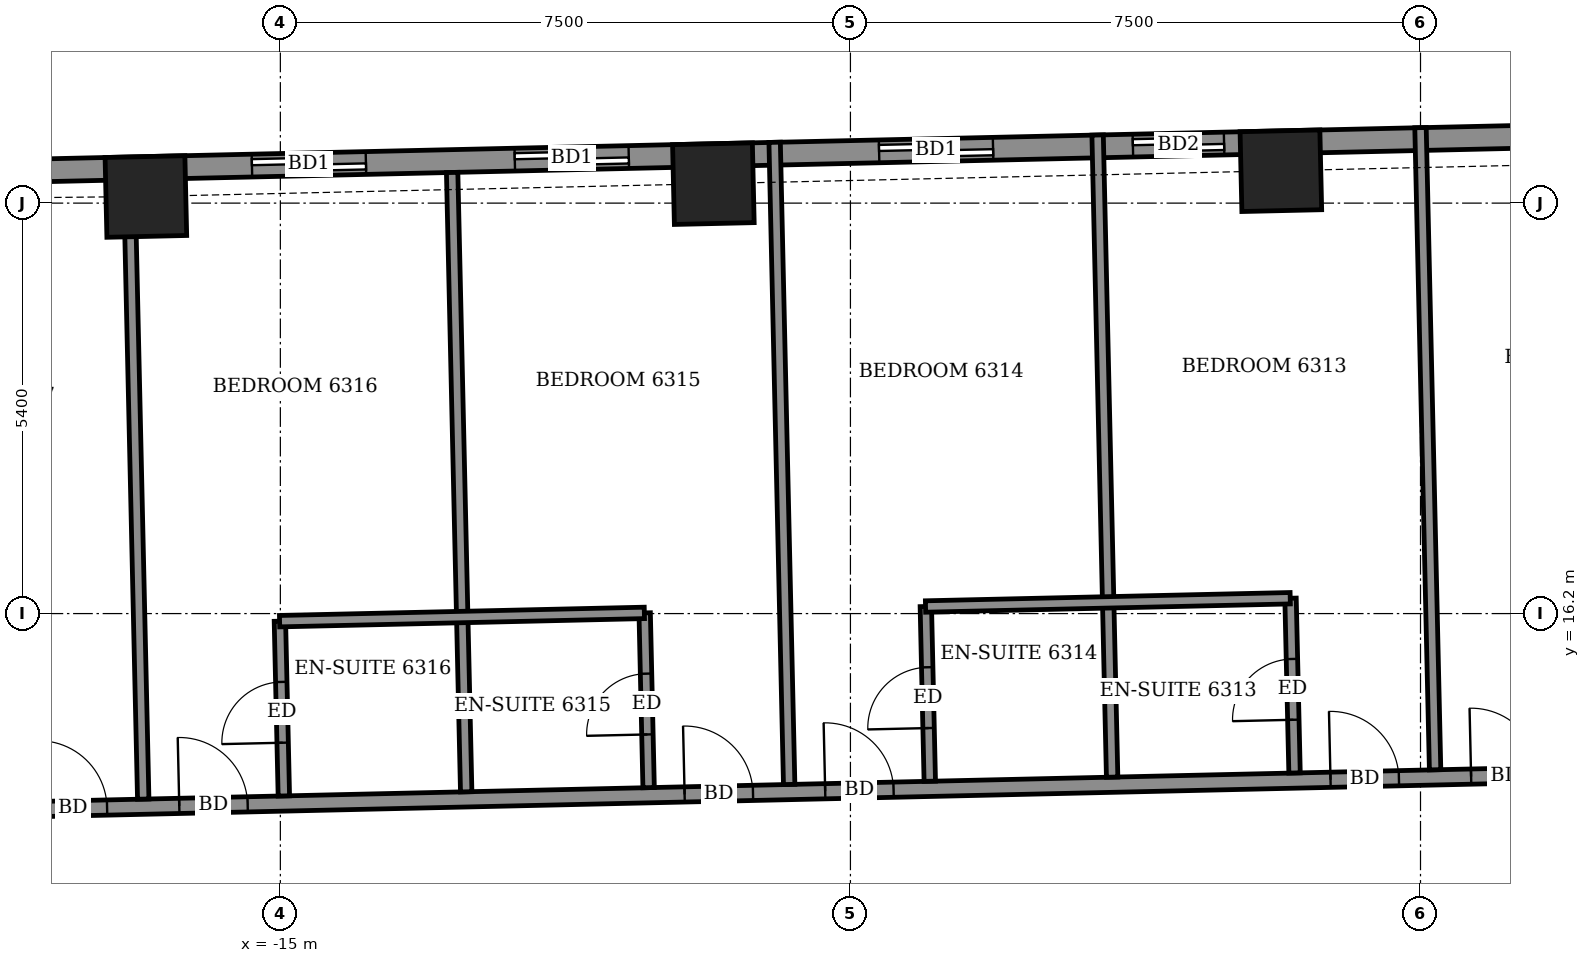
"""IFC4 building model, lengths in metres.
Left out: names, types, materials, properties, quantities, classifications, styles, units other than length and angle.
Written with IfcOpenShell. Run it as: python <this file> out.ifc"""

import sys

from ifc_helpers import new_model, si_unit, direction, frame, frame_2d, origin, origin_2d, place, context, subcontext, project, spatial, rectangle, extrude, element, fill, save


model = new_model("IFC4")
c1 = context("Model", 3, precision=1e-05, world=origin(), true_north=direction((0.0, 1.0)))
c2 = subcontext(c1, "Body", "Model", "MODEL_VIEW")
j1 = project(units=[si_unit("LENGTHUNIT", "METRE"), si_unit("PLANEANGLEUNIT", "RADIAN")], contexts=[c1])
p1 = place(None, origin())
s1 = spatial("IfcSite", under=j1, at=p1, CompositionType="ELEMENT")
p2 = place(p1, origin())
s2 = spatial("IfcBuilding", under=s1, at=p2, CompositionType="ELEMENT")
p3 = place(p2, frame((0.0, 0.0, 249.1)))
s3 = spatial("IfcBuildingStorey", under=s2, at=p3, CompositionType="ELEMENT", Elevation=249.1)
for number, where, z_axis, x_axis in (
    (1, (-1.837, 22.026, -0.55), (0.0, 0.0, 1.0), (-1.0, -0.023, 0.0)),
    (2, (-9.303, 21.856, -0.55), (0.0, 0.0, 1.0), (-1.0, -0.023, 0.0)),
    (3, (-16.769, 21.687, -0.55), (0.0, 0.0, 1.0), (-1.0, -0.023, 0.0)),
):
    element("IfcColumn", number, at=place(p3, frame(where, z_axis=z_axis, x_axis=x_axis)), inside=s3, PredefinedType="COLUMN", context=c2, shape_type="SweptSolid", body=[
        extrude(rectangle(XDim=1.05, YDim=1.05, at=origin_2d()), origin(), (0.0, 0.0, 1.0), 3.6),
    ])
p4 = place(p3, frame((20.403, 22.905, 0.0), z_axis=(0.0, 0.0, 1.0), x_axis=(-0.99974298964, -0.022670568288, 0.0)))
e4 = element("IfcWall", 4, at=p4, inside=s3, PredefinedType="SOLIDWALL", context=c2, shape_type="SweptSolid", body=[
    extrude(rectangle(XDim=44.509, YDim=0.3, at=frame_2d((22.254, 0.0))), origin(), (0.0, 0.0, 1.0), 2.5),
])
p5 = place(p4, frame((1.272, 0.0, 0.0)))
e5 = element("IfcOpeningElement", 5, at=p5, cuts=e4, PredefinedType="OPENING", context=c2, shape_type="SweptSolid", body=[
    extrude(rectangle(XDim=1.5, YDim=2.4, at=frame_2d((0.75, 1.2))), frame((0.0, 0.16, 0.0), z_axis=(0.0, -1.0, 0.0), x_axis=(1.0, 0.0, 0.0)), (0.0, 0.0, 1.0), 0.32),
])
p6 = place(p4, frame((4.501, 0.0, 0.0)))
e6 = element("IfcOpeningElement", 6, at=p6, cuts=e4, PredefinedType="OPENING", context=c2, shape_type="SweptSolid", body=[
    extrude(rectangle(XDim=1.5, YDim=2.4, at=frame_2d((0.75, 1.2))), frame((0.0, 0.16, 0.0), z_axis=(0.0, -1.0, 0.0), x_axis=(1.0, 0.0, 0.0)), (0.0, 0.0, 1.0), 0.32),
])
p7 = place(p4, frame((9.058, 0.0, 0.0)))
e7 = element("IfcOpeningElement", 7, at=p7, cuts=e4, PredefinedType="OPENING", context=c2, shape_type="SweptSolid", body=[
    extrude(rectangle(XDim=1.5, YDim=2.4, at=frame_2d((0.75, 1.2))), frame((0.0, 0.16, 0.0), z_axis=(0.0, -1.0, 0.0), x_axis=(1.0, 0.0, 0.0)), (0.0, 0.0, 1.0), 0.32),
])
p8 = place(p4, frame((12.46, 0.0, 0.0)))
e8 = element("IfcOpeningElement", 8, at=p8, cuts=e4, PredefinedType="OPENING", context=c2, shape_type="SweptSolid", body=[
    extrude(rectangle(XDim=1.5, YDim=2.4, at=frame_2d((0.75, 1.2))), frame((0.0, 0.16, 0.0), z_axis=(0.0, -1.0, 0.0), x_axis=(1.0, 0.0, 0.0)), (0.0, 0.0, 1.0), 0.32),
])
p9 = place(p4, frame((17.533, 0.0, 0.0)))
e9 = element("IfcOpeningElement", 9, at=p9, cuts=e4, PredefinedType="OPENING", context=c2, shape_type="SweptSolid", body=[
    extrude(rectangle(XDim=1.5, YDim=2.4, at=frame_2d((0.75, 1.2))), frame((0.0, 0.16, 0.0), z_axis=(0.0, -1.0, 0.0), x_axis=(1.0, 0.0, 0.0)), (0.0, 0.0, 1.0), 0.32),
])
p10 = place(p4, frame((22.993, 0.0, 0.0)))
e10 = element("IfcOpeningElement", 10, at=p10, cuts=e4, PredefinedType="OPENING", context=c2, shape_type="SweptSolid", body=[
    extrude(rectangle(XDim=1.2, YDim=2.4, at=frame_2d((0.6, 1.2))), frame((0.0, 0.16, 0.0), z_axis=(0.0, -1.0, 0.0), x_axis=(1.0, 0.0, 0.0)), (0.0, 0.0, 1.0), 0.32),
])
p11 = place(p4, frame((26.033, 0.0, 0.0)))
e11 = element("IfcOpeningElement", 11, at=p11, cuts=e4, PredefinedType="OPENING", context=c2, shape_type="SweptSolid", body=[
    extrude(rectangle(XDim=1.5, YDim=2.4, at=frame_2d((0.75, 1.2))), frame((0.0, 0.16, 0.0), z_axis=(0.0, -1.0, 0.0), x_axis=(1.0, 0.0, 0.0)), (0.0, 0.0, 1.0), 0.32),
])
p12 = place(p4, frame((30.827, 0.0, 0.0)))
e12 = element("IfcOpeningElement", 12, at=p12, cuts=e4, PredefinedType="OPENING", context=c2, shape_type="SweptSolid", body=[
    extrude(rectangle(XDim=1.5, YDim=2.4, at=frame_2d((0.75, 1.2))), frame((0.0, 0.16, 0.0), z_axis=(0.0, -1.0, 0.0), x_axis=(1.0, 0.0, 0.0)), (0.0, 0.0, 1.0), 0.32),
])
p13 = place(p4, frame((34.286, 0.0, 0.0)))
e13 = element("IfcOpeningElement", 13, at=p13, cuts=e4, PredefinedType="OPENING", context=c2, shape_type="SweptSolid", body=[
    extrude(rectangle(XDim=1.5, YDim=2.4, at=frame_2d((0.75, 1.2))), frame((0.0, 0.16, 0.0), z_axis=(0.0, -1.0, 0.0), x_axis=(1.0, 0.0, 0.0)), (0.0, 0.0, 1.0), 0.32),
])
p14 = place(p4, frame((38.811, 0.0, 0.0)))
e14 = element("IfcOpeningElement", 14, at=p14, cuts=e4, PredefinedType="OPENING", context=c2, shape_type="SweptSolid", body=[
    extrude(rectangle(XDim=1.5, YDim=2.4, at=frame_2d((0.75, 1.2))), frame((0.0, 0.16, 0.0), z_axis=(0.0, -1.0, 0.0), x_axis=(1.0, 0.0, 0.0)), (0.0, 0.0, 1.0), 0.32),
])
p15 = place(p4, frame((42.148, 0.0, 0.9)))
e15 = element("IfcOpeningElement", 15, at=p15, cuts=e4, PredefinedType="OPENING", context=c2, shape_type="SweptSolid", body=[
    extrude(rectangle(XDim=1.2, YDim=1.5, at=frame_2d((0.6, 0.75))), frame((0.0, 0.16, 0.0), z_axis=(0.0, -1.0, 0.0), x_axis=(1.0, 0.0, 0.0)), (0.0, 0.0, 1.0), 0.32),
])
p16 = place(p3, frame((-27.652, 13.413, 0.0), z_axis=(0.0, 0.0, 1.0), x_axis=(0.999742864992, 0.022676064408, 0.0)))
e16 = element("IfcWall", 16, at=p16, inside=s3, PredefinedType="PARTITIONING", context=c2, shape_type="SweptSolid", body=[
    extrude(rectangle(XDim=50.882, YDim=0.2, at=frame_2d((25.441, 0.0))), origin(), (0.0, 0.0, 1.0), 3.05),
])
p17 = place(p16, frame((47.801, 0.0, 0.0)))
e17 = element("IfcOpeningElement", 17, at=p17, cuts=e16, PredefinedType="OPENING", context=c2, shape_type="SweptSolid", body=[
    extrude(rectangle(XDim=1.0, YDim=2.1, at=frame_2d((0.5, 1.05))), frame((0.0, 0.11, 0.0), z_axis=(0.0, -1.0, 0.0), x_axis=(1.0, 0.0, 0.0)), (0.0, 0.0, 1.0), 0.22),
])
p18 = place(p16, frame((43.425, 0.0, 0.0)))
e18 = element("IfcOpeningElement", 18, at=p18, cuts=e16, PredefinedType="OPENING", context=c2, shape_type="SweptSolid", body=[
    extrude(rectangle(XDim=0.9, YDim=2.1, at=frame_2d((0.45, 1.05))), frame((0.0, 0.11, 0.0), z_axis=(0.0, -1.0, 0.0), x_axis=(1.0, 0.0, 0.0)), (0.0, 0.0, 1.0), 0.22),
])
p19 = place(p16, frame((36.8, 0.0, 0.0)))
e19 = element("IfcOpeningElement", 19, at=p19, cuts=e16, PredefinedType="OPENING", context=c2, shape_type="SweptSolid", body=[
    extrude(rectangle(XDim=0.9, YDim=2.1, at=frame_2d((0.45, 1.05))), frame((0.0, 0.11, 0.0), z_axis=(0.0, -1.0, 0.0), x_axis=(1.0, 0.0, 0.0)), (0.0, 0.0, 1.0), 0.22),
])
p20 = place(p16, frame((34.975, 0.0, 0.0)))
e20 = element("IfcOpeningElement", 20, at=p20, cuts=e16, PredefinedType="OPENING", context=c2, shape_type="SweptSolid", body=[
    extrude(rectangle(XDim=0.9, YDim=2.1, at=frame_2d((0.45, 1.05))), frame((0.0, 0.11, 0.0), z_axis=(0.0, -1.0, 0.0), x_axis=(1.0, 0.0, 0.0)), (0.0, 0.0, 1.0), 0.22),
])
p21 = place(p16, frame((28.325, 0.0, 0.0)))
e21 = element("IfcOpeningElement", 21, at=p21, cuts=e16, PredefinedType="OPENING", context=c2, shape_type="SweptSolid", body=[
    extrude(rectangle(XDim=0.9, YDim=2.1, at=frame_2d((0.45, 1.05))), frame((0.0, 0.11, 0.0), z_axis=(0.0, -1.0, 0.0), x_axis=(1.0, 0.0, 0.0)), (0.0, 0.0, 1.0), 0.22),
])
p22 = place(p16, frame((26.475, 0.0, 0.0)))
e22 = element("IfcOpeningElement", 22, at=p22, cuts=e16, PredefinedType="OPENING", context=c2, shape_type="SweptSolid", body=[
    extrude(rectangle(XDim=0.9, YDim=2.1, at=frame_2d((0.45, 1.05))), frame((0.0, 0.11, 0.0), z_axis=(0.0, -1.0, 0.0), x_axis=(1.0, 0.0, 0.0)), (0.0, 0.0, 1.0), 0.22),
])
p23 = place(p16, frame((19.825, 0.0, 0.0)))
e23 = element("IfcOpeningElement", 23, at=p23, cuts=e16, PredefinedType="OPENING", context=c2, shape_type="SweptSolid", body=[
    extrude(rectangle(XDim=0.9, YDim=2.1, at=frame_2d((0.45, 1.05))), frame((0.0, 0.11, 0.0), z_axis=(0.0, -1.0, 0.0), x_axis=(1.0, 0.0, 0.0)), (0.0, 0.0, 1.0), 0.22),
])
p24 = place(p16, frame((17.975, 0.0, 0.0)))
e24 = element("IfcOpeningElement", 24, at=p24, cuts=e16, PredefinedType="OPENING", context=c2, shape_type="SweptSolid", body=[
    extrude(rectangle(XDim=0.9, YDim=2.1, at=frame_2d((0.45, 1.05))), frame((0.0, 0.11, 0.0), z_axis=(0.0, -1.0, 0.0), x_axis=(1.0, 0.0, 0.0)), (0.0, 0.0, 1.0), 0.22),
])
p25 = place(p16, frame((11.325, 0.0, 0.0)))
e25 = element("IfcOpeningElement", 25, at=p25, cuts=e16, PredefinedType="OPENING", context=c2, shape_type="SweptSolid", body=[
    extrude(rectangle(XDim=0.9, YDim=2.1, at=frame_2d((0.45, 1.05))), frame((0.0, 0.11, 0.0), z_axis=(0.0, -1.0, 0.0), x_axis=(1.0, 0.0, 0.0)), (0.0, 0.0, 1.0), 0.22),
])
p26 = place(p16, frame((9.475, 0.0, 0.0)))
e26 = element("IfcOpeningElement", 26, at=p26, cuts=e16, PredefinedType="OPENING", context=c2, shape_type="SweptSolid", body=[
    extrude(rectangle(XDim=0.9, YDim=2.1, at=frame_2d((0.45, 1.05))), frame((0.0, 0.11, 0.0), z_axis=(0.0, -1.0, 0.0), x_axis=(1.0, 0.0, 0.0)), (0.0, 0.0, 1.0), 0.22),
])
p27 = place(p16, frame((2.772, 0.0, 0.0)))
e27 = element("IfcOpeningElement", 27, at=p27, cuts=e16, PredefinedType="OPENING", context=c2, shape_type="SweptSolid", body=[
    extrude(rectangle(XDim=1.0, YDim=2.1, at=frame_2d((0.5, 1.05))), frame((0.0, 0.11, 0.0), z_axis=(0.0, -1.0, 0.0), x_axis=(1.0, 0.0, 0.0)), (0.0, 0.0, 1.0), 0.22),
])
p28 = place(p3, frame((-16.804, 13.759, 0.0), z_axis=(0.0, 0.0, 1.0), x_axis=(-0.022586673637, 0.999744888546, 0.0)))
e28 = element("IfcWall", 28, at=p28, inside=s3, PredefinedType="PARTITIONING", context=c2, shape_type="SweptSolid", body=[
    extrude(rectangle(XDim=8.15, YDim=0.15, at=frame_2d((4.075, 0.0))), origin(), (0.0, 0.0, 1.0), 3.05),
])
p29 = place(p3, frame((-14.954, 13.801, 0.0), z_axis=(0.0, 0.0, 1.0), x_axis=(-0.022612884682, 0.999744296031, 0.0)))
e29 = element("IfcWall", 29, at=p29, inside=s3, PredefinedType="PARTITIONING", context=c2, shape_type="SweptSolid", body=[
    extrude(rectangle(XDim=2.3, YDim=0.15, at=frame_2d((1.15, 0.0))), origin(), (0.0, 0.0, 1.0), 3.05),
])
p30 = place(p29, frame((0.7, 0.0, 0.0)))
e30 = element("IfcOpeningElement", 30, at=p30, cuts=e29, PredefinedType="OPENING", context=c2, shape_type="SweptSolid", body=[
    extrude(rectangle(XDim=0.8, YDim=2.1, at=frame_2d((0.4, 1.05))), frame((0.0, 0.085, 0.0), z_axis=(0.0, -1.0, 0.0), x_axis=(1.0, 0.0, 0.0)), (0.0, 0.0, 1.0), 0.17),
])
p31 = place(p3, frame((-12.555, 13.855, 0.0), z_axis=(0.0, 0.0, 1.0), x_axis=(-0.022706435224, 0.999742175663, 0.0)))
e31 = element("IfcWall", 31, at=p31, inside=s3, PredefinedType="PARTITIONING", context=c2, shape_type="SweptSolid", body=[
    extrude(rectangle(XDim=8.15, YDim=0.15, at=frame_2d((4.075, 0.0))), origin(), (0.0, 0.0, 1.0), 2.5),
])
p32 = place(p3, frame((-10.155, 13.91, 0.0), z_axis=(0.0, 0.0, 1.0), x_axis=(-0.022612884682, 0.999744296031, 0.0)))
e32 = element("IfcWall", 32, at=p32, inside=s3, PredefinedType="PARTITIONING", context=c2, shape_type="SweptSolid", body=[
    extrude(rectangle(XDim=2.3, YDim=0.15, at=frame_2d((1.15, 0.0))), origin(), (0.0, 0.0, 1.0), 3.05),
])
p33 = place(p32, frame((0.7, 0.0, 0.0)))
e33 = element("IfcOpeningElement", 33, at=p33, cuts=e32, PredefinedType="OPENING", context=c2, shape_type="SweptSolid", body=[
    extrude(rectangle(XDim=0.8, YDim=2.1, at=frame_2d((0.4, 1.05))), frame((0.0, 0.085, 0.0), z_axis=(0.0, -1.0, 0.0), x_axis=(1.0, 0.0, 0.0)), (0.0, 0.0, 1.0), 0.17),
])
p34 = place(p3, frame((-8.306, 13.952, 0.0), z_axis=(0.0, 0.0, 1.0), x_axis=(-0.022622304913, 0.999744082913, 0.0)))
e34 = element("IfcWall", 34, at=p34, inside=s3, PredefinedType="PARTITIONING", context=c2, shape_type="SweptSolid", body=[
    extrude(rectangle(XDim=8.45, YDim=0.15, at=frame_2d((4.225, 0.0))), origin(), (0.0, 0.0, 1.0), 2.5),
])
p35 = place(p3, frame((-6.456, 13.994, 0.0), z_axis=(0.0, 0.0, 1.0), x_axis=(-0.022612884682, 0.999744296031, 0.0)))
e35 = element("IfcWall", 35, at=p35, inside=s3, PredefinedType="PARTITIONING", context=c2, shape_type="SweptSolid", body=[
    extrude(rectangle(XDim=2.3, YDim=0.15, at=frame_2d((1.15, 0.0))), origin(), (0.0, 0.0, 1.0), 3.05),
])
p36 = place(p35, frame((0.7, 0.0, 0.0)))
e36 = element("IfcOpeningElement", 36, at=p36, cuts=e35, PredefinedType="OPENING", context=c2, shape_type="SweptSolid", body=[
    extrude(rectangle(XDim=0.8, YDim=2.1, at=frame_2d((0.4, 1.05))), frame((0.0, 0.085, 0.0), z_axis=(0.0, -1.0, 0.0), x_axis=(1.0, 0.0, 0.0)), (0.0, 0.0, 1.0), 0.17),
])
p37 = place(p3, frame((-4.057, 14.048, 0.0), z_axis=(0.0, 0.0, 1.0), x_axis=(-0.022622304913, 0.999744082913, 0.0)))
e37 = element("IfcWall", 37, at=p37, inside=s3, PredefinedType="PARTITIONING", context=c2, shape_type="SweptSolid", body=[
    extrude(rectangle(XDim=8.45, YDim=0.15, at=frame_2d((4.225, 0.0))), origin(), (0.0, 0.0, 1.0), 2.5),
])
p38 = place(p3, frame((-1.657, 14.103, 0.0), z_axis=(0.0, 0.0, 1.0), x_axis=(-0.023037316498, 0.999734605807, 0.0)))
e38 = element("IfcWall", 38, at=p38, inside=s3, PredefinedType="PARTITIONING", context=c2, shape_type="SweptSolid", body=[
    extrude(rectangle(XDim=2.3, YDim=0.15, at=frame_2d((1.15, 0.0))), origin(), (0.0, 0.0, 1.0), 3.05),
])
p39 = place(p38, frame((0.7, 0.0, 0.0)))
e39 = element("IfcOpeningElement", 39, at=p39, cuts=e38, PredefinedType="OPENING", context=c2, shape_type="SweptSolid", body=[
    extrude(rectangle(XDim=0.8, YDim=2.1, at=frame_2d((0.4, 1.05))), frame((0.0, 0.085, 0.0), z_axis=(0.0, -1.0, 0.0), x_axis=(1.0, 0.0, 0.0)), (0.0, 0.0, 1.0), 0.17),
])
p40 = place(p3, frame((0.192, 14.145, 0.0), z_axis=(0.0, 0.0, 1.0), x_axis=(-0.022708935798, 0.999742118866, 0.0)))
e40 = element("IfcWall", 40, at=p40, inside=s3, PredefinedType="PARTITIONING", context=c2, shape_type="SweptSolid", body=[
    extrude(rectangle(XDim=8.45, YDim=0.15, at=frame_2d((4.225, 0.0))), origin(), (0.0, 0.0, 1.0), 2.5),
])
p41 = place(p3, frame((-15.01, 16.1, 0.0), z_axis=(0.0, 0.0, 1.0), x_axis=(0.999742701292, 0.022683280499, 0.0)))
e41 = element("IfcWall", 41, at=p41, inside=s3, PredefinedType="PARTITIONING", context=c2, shape_type="SweptSolid", body=[
    extrude(rectangle(XDim=4.8, YDim=0.15, at=frame_2d((2.4, 0.0))), origin(), (0.0, 0.0, 1.0), 3.05),
])
p42 = place(p3, frame((-6.512, 16.293, 0.0), z_axis=(0.0, 0.0, 1.0), x_axis=(0.999741415159, 0.022739894798, 0.0)))
e42 = element("IfcWall", 42, at=p42, inside=s3, PredefinedType="PARTITIONING", context=c2, shape_type="SweptSolid", body=[
    extrude(rectangle(XDim=4.799, YDim=0.15, at=frame_2d((2.399, 0.0))), origin(), (0.0, 0.0, 1.0), 3.05),
])
p43 = place(p10, origin())
e43 = element("IfcDoor", 43, at=p43, inside=s3, OperationType="SLIDING_TO_LEFT", PredefinedType="DOOR", context=c2, shape_type="SweptSolid", body=[
    extrude(rectangle(XDim=1.2, YDim=2.4, at=frame_2d((0.6, 1.2))), frame((0.0, 0.025, 0.0), z_axis=(0.0, -1.0, 0.0), x_axis=(1.0, 0.0, 0.0)), (0.0, 0.0, 1.0), 0.05),
])
fill(e10, e43)
p44 = place(p11, origin())
e44 = element("IfcDoor", 44, at=p44, inside=s3, OperationType="SLIDING_TO_LEFT", PredefinedType="DOOR", context=c2, shape_type="SweptSolid", body=[
    extrude(rectangle(XDim=1.5, YDim=2.4, at=frame_2d((0.75, 1.2))), frame((0.0, 0.025, 0.0), z_axis=(0.0, -1.0, 0.0), x_axis=(1.0, 0.0, 0.0)), (0.0, 0.0, 1.0), 0.05),
])
fill(e11, e44)
p45 = place(p12, origin())
e45 = element("IfcDoor", 45, at=p45, inside=s3, OperationType="SLIDING_TO_LEFT", PredefinedType="DOOR", context=c2, shape_type="SweptSolid", body=[
    extrude(rectangle(XDim=1.5, YDim=2.4, at=frame_2d((0.75, 1.2))), frame((0.0, 0.025, 0.0), z_axis=(0.0, -1.0, 0.0), x_axis=(1.0, 0.0, 0.0)), (0.0, 0.0, 1.0), 0.05),
])
fill(e12, e45)
p46 = place(p13, origin())
e46 = element("IfcDoor", 46, at=p46, inside=s3, OperationType="SLIDING_TO_LEFT", PredefinedType="DOOR", context=c2, shape_type="SweptSolid", body=[
    extrude(rectangle(XDim=1.5, YDim=2.4, at=frame_2d((0.75, 1.2))), frame((0.0, 0.025, 0.0), z_axis=(0.0, -1.0, 0.0), x_axis=(1.0, 0.0, 0.0)), (0.0, 0.0, 1.0), 0.05),
])
fill(e13, e46)
p47 = place(p21, origin())
e47 = element("IfcDoor", 47, at=p47, inside=s3, OperationType="SINGLE_SWING_RIGHT", PredefinedType="DOOR", context=c2, shape_type="SweptSolid", body=[
    extrude(rectangle(XDim=0.9, YDim=2.1, at=frame_2d((0.45, 1.05))), frame((0.0, 0.025, 0.0), z_axis=(0.0, -1.0, 0.0), x_axis=(1.0, 0.0, 0.0)), (0.0, 0.0, 1.0), 0.05),
])
fill(e21, e47)
p48 = place(p22, origin())
e48 = element("IfcDoor", 48, at=p48, inside=s3, OperationType="SINGLE_SWING_LEFT", PredefinedType="DOOR", context=c2, shape_type="SweptSolid", body=[
    extrude(rectangle(XDim=0.9, YDim=2.1, at=frame_2d((0.45, 1.05))), frame((0.0, 0.025, 0.0), z_axis=(0.0, -1.0, 0.0), x_axis=(1.0, 0.0, 0.0)), (0.0, 0.0, 1.0), 0.05),
])
fill(e22, e48)
p49 = place(p39, origin())
e49 = element("IfcDoor", 49, at=p49, inside=s3, OperationType="SINGLE_SWING_LEFT", PredefinedType="DOOR", context=c2, shape_type="SweptSolid", body=[
    extrude(rectangle(XDim=0.8, YDim=2.1, at=frame_2d((0.4, 1.05))), frame((0.0, 0.025, 0.0), z_axis=(0.0, -1.0, 0.0), x_axis=(1.0, 0.0, 0.0)), (0.0, 0.0, 1.0), 0.05),
])
fill(e39, e49)
p50 = place(p23, origin())
e50 = element("IfcDoor", 50, at=p50, inside=s3, OperationType="SINGLE_SWING_RIGHT", PredefinedType="DOOR", context=c2, shape_type="SweptSolid", body=[
    extrude(rectangle(XDim=0.9, YDim=2.1, at=frame_2d((0.45, 1.05))), frame((0.0, 0.025, 0.0), z_axis=(0.0, -1.0, 0.0), x_axis=(1.0, 0.0, 0.0)), (0.0, 0.0, 1.0), 0.05),
])
fill(e23, e50)
p51 = place(p36, origin())
e51 = element("IfcDoor", 51, at=p51, inside=s3, OperationType="SINGLE_SWING_RIGHT", PredefinedType="DOOR", context=c2, shape_type="SweptSolid", body=[
    extrude(rectangle(XDim=0.8, YDim=2.1, at=frame_2d((0.4, 1.05))), frame((0.0, 0.025, 0.0), z_axis=(0.0, -1.0, 0.0), x_axis=(1.0, 0.0, 0.0)), (0.0, 0.0, 1.0), 0.05),
])
fill(e36, e51)
p52 = place(p24, origin())
e52 = element("IfcDoor", 52, at=p52, inside=s3, OperationType="SINGLE_SWING_LEFT", PredefinedType="DOOR", context=c2, shape_type="SweptSolid", body=[
    extrude(rectangle(XDim=0.9, YDim=2.1, at=frame_2d((0.45, 1.05))), frame((0.0, 0.025, 0.0), z_axis=(0.0, -1.0, 0.0), x_axis=(1.0, 0.0, 0.0)), (0.0, 0.0, 1.0), 0.05),
])
fill(e24, e52)
p53 = place(p33, origin())
e53 = element("IfcDoor", 53, at=p53, inside=s3, OperationType="SINGLE_SWING_LEFT", PredefinedType="DOOR", context=c2, shape_type="SweptSolid", body=[
    extrude(rectangle(XDim=0.8, YDim=2.1, at=frame_2d((0.4, 1.05))), frame((0.0, 0.025, 0.0), z_axis=(0.0, -1.0, 0.0), x_axis=(1.0, 0.0, 0.0)), (0.0, 0.0, 1.0), 0.05),
])
fill(e33, e53)
p54 = place(p25, origin())
e54 = element("IfcDoor", 54, at=p54, inside=s3, OperationType="SINGLE_SWING_RIGHT", PredefinedType="DOOR", context=c2, shape_type="SweptSolid", body=[
    extrude(rectangle(XDim=0.9, YDim=2.1, at=frame_2d((0.45, 1.05))), frame((0.0, 0.025, 0.0), z_axis=(0.0, -1.0, 0.0), x_axis=(1.0, 0.0, 0.0)), (0.0, 0.0, 1.0), 0.05),
])
fill(e25, e54)
p55 = place(p30, origin())
e55 = element("IfcDoor", 55, at=p55, inside=s3, OperationType="SINGLE_SWING_RIGHT", PredefinedType="DOOR", context=c2, shape_type="SweptSolid", body=[
    extrude(rectangle(XDim=0.8, YDim=2.1, at=frame_2d((0.4, 1.05))), frame((0.0, 0.025, 0.0), z_axis=(0.0, -1.0, 0.0), x_axis=(1.0, 0.0, 0.0)), (0.0, 0.0, 1.0), 0.05),
])
fill(e30, e55)
p56 = place(p26, origin())
e56 = element("IfcDoor", 56, at=p56, inside=s3, OperationType="SINGLE_SWING_LEFT", PredefinedType="DOOR", context=c2, shape_type="SweptSolid", body=[
    extrude(rectangle(XDim=0.9, YDim=2.1, at=frame_2d((0.45, 1.05))), frame((0.0, 0.025, 0.0), z_axis=(0.0, -1.0, 0.0), x_axis=(1.0, 0.0, 0.0)), (0.0, 0.0, 1.0), 0.05),
])
fill(e26, e56)
save(model, sys.argv[1])
